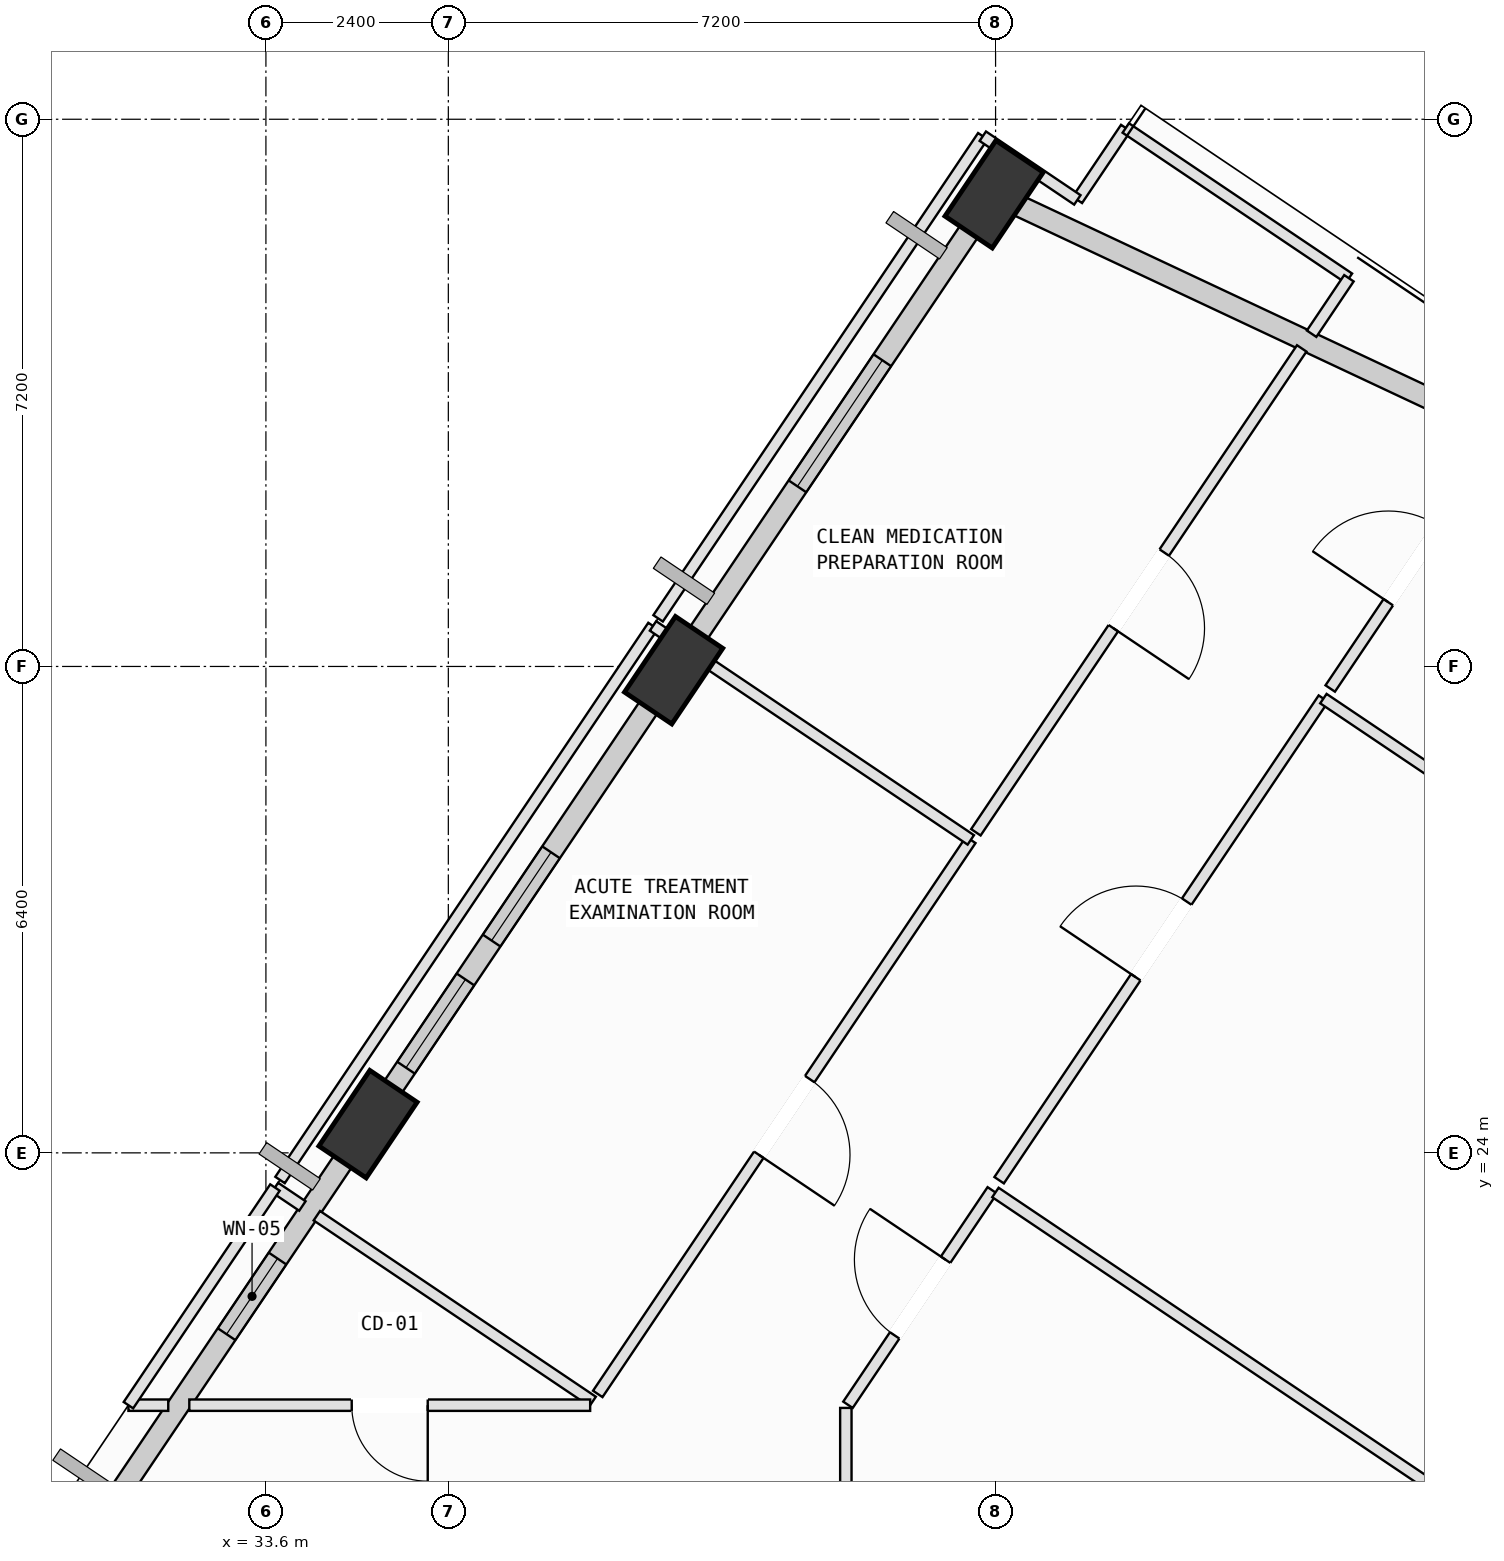
"""IFC4 building model, lengths in metres.
Left out: names, types, materials, properties, quantities, classifications, styles, units other than length and angle.
Written with IfcOpenShell. Run it as: python <this file> out.ifc"""

import sys

from ifc_helpers import new_model, si_unit, direction, frame, frame_2d, origin, origin_2d, place, context, subcontext, project, spatial, rectangle, extrude, element, fill, save


model = new_model("IFC4")
c1 = context("Model", 3, precision=1e-05, world=origin(), true_north=direction((0.0, 1.0)))
c2 = subcontext(c1, "Body", "Model", "MODEL_VIEW")
j1 = project(units=[si_unit("LENGTHUNIT", "METRE"), si_unit("PLANEANGLEUNIT", "RADIAN")], contexts=[c1])
p1 = place(None, origin())
s1 = spatial("IfcSite", under=j1, at=p1, CompositionType="ELEMENT")
p2 = place(p1, origin())
s2 = spatial("IfcBuilding", under=s1, at=p2, CompositionType="ELEMENT")
p3 = place(p2, frame((0.0, 0.0, 263.2)))
s3 = spatial("IfcBuildingStorey", under=s2, at=p3, CompositionType="ELEMENT", Elevation=263.2)
p4 = place(p3, frame((43.181, 36.614, 0.002), z_axis=(-0.049210235078, 0.039220187355, 0.998018100872), x_axis=(0.299343869523, -0.952716333944, 0.052199950338)))
e1 = element("IfcColumn", 1, at=p4, inside=s3, PredefinedType="COLUMN", context=c2, shape_type="SweptSolid", body=[
    extrude(rectangle(XDim=1.2, YDim=0.75, at=origin_2d()), origin(), (0.0, 0.0, 1.0), 3.959),
])
p5 = place(p3, frame((38.964, 30.351, 0.002), z_axis=(-0.023155395107, 0.02198841233, 0.99949003867), x_axis=(0.216657402082, -0.97588827635, 0.026488529682)))
e2 = element("IfcColumn", 2, at=p5, inside=s3, PredefinedType="COLUMN", context=c2, shape_type="SweptSolid", body=[
    extrude(rectangle(XDim=1.2, YDim=0.75, at=origin_2d()), origin(), (0.0, 0.0, 1.0), 3.975),
])
p6 = place(p3, frame((34.943, 24.378, 0.002), z_axis=(0.001651449321, 0.005565995859, 0.999983146061), x_axis=(-0.771351837529, -0.636390719713, 0.004816077748)))
e3 = element("IfcColumn", 3, at=p6, inside=s3, PredefinedType="COLUMN", context=c2, shape_type="SweptSolid", body=[
    extrude(rectangle(XDim=1.2, YDim=0.75, at=origin_2d()), origin(), (0.0, 0.0, 1.0), 3.991),
])
p7 = place(p3, frame((43.428, 36.497, 0.0), z_axis=(0.0, 0.0, 1.0), x_axis=(0.905122173165, -0.425151563145, 0.0)))
e4 = element("IfcWall", 4, at=p7, inside=s3, PredefinedType="SOLIDWALL", context=c2, shape_type="SweptSolid", body=[
    extrude(rectangle(XDim=9.036, YDim=0.28, at=frame_2d((4.518, 0.0))), origin(), (0.0, 0.0, 1.0), 3.185),
])
p8 = place(p3, frame((39.189, 30.685, 0.0), z_axis=(0.0, 0.0, 1.0), x_axis=(0.55845071532, 0.82953770171, 0.0)))
e5 = element("IfcWall", 5, at=p8, inside=s3, PredefinedType="SOLIDWALL", context=c2, shape_type="SweptSolid", body=[
    extrude(rectangle(XDim=6.78, YDim=0.28, at=frame_2d((3.39, 0.0))), origin(), (0.0, 0.0, 1.0), 3.185),
])
p9 = place(p8, frame((2.514, 0.0, 0.75)))
e6 = element("IfcOpeningElement", 6, at=p9, cuts=e5, PredefinedType="OPENING", context=c2, shape_type="SweptSolid", body=[
    extrude(rectangle(XDim=2.0, YDim=1.95, at=frame_2d((1.0, 0.975))), frame((0.0, 0.15, 0.0), z_axis=(0.0, -1.0, 0.0), x_axis=(1.0, 0.0, 0.0)), (0.0, 0.0, 1.0), 0.3),
])
p10 = place(p3, frame((35.171, 24.717, 0.0), z_axis=(0.0, 0.0, 1.0), x_axis=(0.558474163373, 0.829521915832, 0.0)))
e7 = element("IfcWall", 7, at=p10, inside=s3, PredefinedType="SOLIDWALL", context=c2, shape_type="SweptSolid", body=[
    extrude(rectangle(XDim=6.41, YDim=0.28, at=frame_2d((3.205, 0.0))), origin(), (0.0, 0.0, 1.0), 3.185),
])
p11 = place(p10, frame((2.503, 0.0, 0.75)))
e8 = element("IfcOpeningElement", 8, at=p11, cuts=e7, PredefinedType="OPENING", context=c2, shape_type="SweptSolid", body=[
    extrude(rectangle(XDim=1.4, YDim=1.85, at=frame_2d((0.7, 0.925))), frame((0.0, 0.15, 0.0), z_axis=(0.0, -1.0, 0.0), x_axis=(1.0, 0.0, 0.0)), (0.0, 0.0, 1.0), 0.3),
])
p12 = place(p10, frame((0.487, 0.0, 0.75)))
e9 = element("IfcOpeningElement", 9, at=p12, cuts=e7, PredefinedType="OPENING", context=c2, shape_type="SweptSolid", body=[
    extrude(rectangle(XDim=1.4, YDim=1.85, at=frame_2d((0.7, 0.925))), frame((0.0, 0.15, 0.0), z_axis=(0.0, -1.0, 0.0), x_axis=(1.0, 0.0, 0.0)), (0.0, 0.0, 1.0), 0.3),
])
p13 = place(p3, frame((31.288, 18.949, 0.0), z_axis=(0.0, 0.0, 1.0), x_axis=(0.558472908241, 0.829522760846, 0.0)))
e10 = element("IfcWall", 10, at=p13, inside=s3, PredefinedType="SOLIDWALL", context=c2, shape_type="SweptSolid", body=[
    extrude(rectangle(XDim=6.158, YDim=0.28, at=frame_2d((3.079, 0.0))), origin(), (0.0, 0.0, 1.0), 3.185),
])
p14 = place(p13, frame((3.213, 0.0, 0.75)))
e11 = element("IfcOpeningElement", 11, at=p14, cuts=e10, PredefinedType="OPENING", context=c2, shape_type="SweptSolid", body=[
    extrude(rectangle(XDim=1.2, YDim=1.75, at=frame_2d((0.6, 0.875))), frame((0.0, 0.15, 0.0), z_axis=(0.0, -1.0, 0.0), x_axis=(1.0, 0.0, 0.0)), (0.0, 0.0, 1.0), 0.3),
])
p15 = place(p3, frame((25.005, 22.69, 0.0), z_axis=(0.0, 0.0, 1.0), x_axis=(0.829509910624, -0.558491994729, 0.0)))
e12 = element("IfcWall", 12, at=p15, inside=s3, PredefinedType="SOLIDWALL", context=c2, shape_type="SweptSolid", body=[
    extrude(rectangle(XDim=6.958, YDim=0.28, at=frame_2d((3.479, 0.0))), origin(), (0.0, 0.0, 1.0), 3.085),
])
p16 = place(p3, frame((41.23, 17.95, 0.0), z_axis=(0.0, 0.0, 1.0), x_axis=(0.0, 1.0, 0.0)))
e13 = element("IfcWall", 13, at=p16, inside=s3, PredefinedType="PARTITIONING", context=c2, shape_type="SweptSolid", body=[
    extrude(rectangle(XDim=2.694, YDim=0.15, at=frame_2d((1.347, 0.0))), origin(), (0.0, 0.0, 1.0), 3.7),
])
p17 = place(p3, frame((41.258, 20.685, 0.0), z_axis=(0.0, 0.0, 1.0), x_axis=(0.558272819902, 0.829657434462, 0.0)))
e14 = element("IfcWall", 14, at=p17, inside=s3, PredefinedType="PARTITIONING", context=c2, shape_type="SweptSolid", body=[
    extrude(rectangle(XDim=3.401, YDim=0.15, at=frame_2d((1.701, 0.0))), origin(), (0.0, 0.0, 1.0), 3.7),
])
p18 = place(p17, frame((1.101, 0.0, 0.0)))
e15 = element("IfcOpeningElement", 15, at=p18, cuts=e14, PredefinedType="OPENING", context=c2, shape_type="SweptSolid", body=[
    extrude(rectangle(XDim=1.2, YDim=2.15, at=frame_2d((0.6, 1.075))), frame((0.0, 0.085, 0.0), z_axis=(0.0, -1.0, 0.0), x_axis=(1.0, 0.0, 0.0)), (0.0, 0.0, 1.0), 0.17),
])
p19 = place(p3, frame((43.198, 23.479, 0.0), z_axis=(0.0, 0.0, 1.0), x_axis=(0.829581933243, -0.558385006994, 0.0)))
e16 = element("IfcWall", 16, at=p19, inside=s3, PredefinedType="PARTITIONING", context=c2, shape_type="SweptSolid", body=[
    extrude(rectangle(XDim=13.466, YDim=0.15, at=frame_2d((6.733, 0.0))), origin(), (0.0, 0.0, 1.0), 3.7),
])
p20 = place(p3, frame((43.247, 23.64, 0.0), z_axis=(0.0, 0.0, 1.0), x_axis=(0.558419088265, 0.829558992394, 0.0)))
e17 = element("IfcWall", 17, at=p20, inside=s3, PredefinedType="PARTITIONING", context=c2, shape_type="SweptSolid", body=[
    extrude(rectangle(XDim=7.639, YDim=0.15, at=frame_2d((3.82, 0.0))), origin(), (0.0, 0.0, 1.0), 3.7),
])
p21 = place(p20, frame((3.219, 0.0, 0.0)))
e18 = element("IfcOpeningElement", 18, at=p21, cuts=e17, PredefinedType="OPENING", context=c2, shape_type="SweptSolid", body=[
    extrude(rectangle(XDim=1.2, YDim=2.15, at=frame_2d((0.6, 1.075))), frame((0.0, 0.085, 0.0), z_axis=(0.0, -1.0, 0.0), x_axis=(1.0, 0.0, 0.0)), (0.0, 0.0, 1.0), 0.17),
])
p22 = place(p3, frame((47.513, 29.977, 0.0), z_axis=(0.0, 0.0, 1.0), x_axis=(0.829559460975, -0.558418392164, 0.0)))
e19 = element("IfcWall", 19, at=p22, inside=s3, PredefinedType="PARTITIONING", context=c2, shape_type="SweptSolid", body=[
    extrude(rectangle(XDim=13.148, YDim=0.15, at=frame_2d((6.574, 0.0))), origin(), (0.0, 0.0, 1.0), 3.7),
])
p23 = place(p3, frame((47.603, 30.11, 0.0), z_axis=(0.0, 0.0, 1.0), x_axis=(0.558515056405, 0.829494383205, 0.0)))
e20 = element("IfcWall", 20, at=p23, inside=s3, PredefinedType="PARTITIONING", context=c2, shape_type="SweptSolid", body=[
    extrude(rectangle(XDim=3.937, YDim=0.15, at=frame_2d((1.969, 0.0))), origin(), (0.0, 0.0, 1.0), 3.7),
])
p24 = place(p23, frame((1.369, 0.0, 0.0)))
e21 = element("IfcOpeningElement", 21, at=p24, cuts=e20, PredefinedType="OPENING", context=c2, shape_type="SweptSolid", body=[
    extrude(rectangle(XDim=1.2, YDim=2.15, at=frame_2d((0.6, 1.075))), frame((0.0, 0.085, 0.0), z_axis=(0.0, -1.0, 0.0), x_axis=(1.0, 0.0, 0.0)), (0.0, 0.0, 1.0), 0.17),
])
p25 = place(p3, frame((33.719, 23.544, 0.0), z_axis=(0.0, 0.0, 1.0), x_axis=(0.82971266227, -0.55819073628, 0.0)))
e22 = element("IfcWall", 22, at=p25, inside=s3, PredefinedType="PARTITIONING", context=c2, shape_type="SweptSolid", body=[
    extrude(rectangle(XDim=0.435, YDim=0.15, at=frame_2d((0.218, 0.0))), origin(), (0.0, 0.0, 1.0), 3.7),
])
p26 = place(p3, frame((34.27, 23.173, 0.0), z_axis=(0.0, 0.0, 1.0), x_axis=(0.82942268085, -0.558621532427, 0.0)))
e23 = element("IfcWall", 23, at=p26, inside=s3, PredefinedType="PARTITIONING", context=c2, shape_type="SweptSolid", body=[
    extrude(rectangle(XDim=4.375, YDim=0.15, at=frame_2d((2.188, 0.0))), origin(), (0.0, 0.0, 1.0), 3.7),
])
p27 = place(p3, frame((37.866, 20.68, 0.0), z_axis=(0.0, 0.0, 1.0), x_axis=(-1.0, 0.0, 0.0)))
e24 = element("IfcWall", 24, at=p27, inside=s3, PredefinedType="PARTITIONING", context=c2, shape_type="SweptSolid", body=[
    extrude(rectangle(XDim=5.274, YDim=0.15, at=frame_2d((2.637, 0.0))), origin(), (0.0, 0.0, 1.0), 3.335),
])
p28 = place(p27, frame((2.137, 0.0, 0.0)))
e25 = element("IfcOpeningElement", 25, at=p28, cuts=e24, PredefinedType="OPENING", context=c2, shape_type="SweptSolid", body=[
    extrude(rectangle(XDim=1.0, YDim=2.12, at=frame_2d((0.5, 1.06))), frame((0.0, 0.085, 0.0), z_axis=(0.0, -1.0, 0.0), x_axis=(1.0, 0.0, 0.0)), (0.0, 0.0, 1.0), 0.17),
])
p29 = place(p3, frame((32.315, 20.68, 0.0), z_axis=(0.0, 0.0, 1.0), x_axis=(-1.0, 0.0, 0.0)))
e26 = element("IfcWall", 26, at=p29, inside=s3, PredefinedType="PARTITIONING", context=c2, shape_type="SweptSolid", body=[
    extrude(rectangle(XDim=0.524, YDim=0.15, at=frame_2d((0.262, 0.0))), origin(), (0.0, 0.0, 1.0), 3.7),
])
p30 = place(p3, frame((31.791, 20.68, 0.0), z_axis=(0.0, 0.0, 1.0), x_axis=(0.558431585415, 0.829550579778, 0.0)))
e27 = element("IfcWall", 27, at=p30, inside=s3, PredefinedType="PARTITIONING", context=c2, shape_type="SweptSolid", body=[
    extrude(rectangle(XDim=3.452, YDim=0.15, at=frame_2d((1.726, 0.0))), origin(), (0.0, 0.0, 1.0), 3.7),
])
p31 = place(p3, frame((42.874, 28.118, 0.0), z_axis=(0.0, 0.0, 1.0), x_axis=(-0.558470489053, -0.829524389549, 0.0)))
e28 = element("IfcWall", 28, at=p31, inside=s3, PredefinedType="PARTITIONING", context=c2, shape_type="SweptSolid", body=[
    extrude(rectangle(XDim=8.788, YDim=0.15, at=frame_2d((4.394, 0.0))), origin(), (0.0, 0.0, 1.0), 3.7),
])
p32 = place(p31, frame((3.794, 0.0, 0.0)))
e29 = element("IfcOpeningElement", 29, at=p32, cuts=e28, PredefinedType="OPENING", context=c2, shape_type="SweptSolid", body=[
    extrude(rectangle(XDim=1.2, YDim=2.15, at=frame_2d((0.6, 1.075))), frame((0.0, 0.085, 0.0), z_axis=(0.0, -1.0, 0.0), x_axis=(1.0, 0.0, 0.0)), (0.0, 0.0, 1.0), 0.17),
])
p33 = place(p3, frame((33.786, 23.643, 0.0), z_axis=(0.0, 0.0, 1.0), x_axis=(0.558413136962, 0.829562998492, 0.0)))
e30 = element("IfcWall", 30, at=p33, inside=s3, PredefinedType="PARTITIONING", context=c2, shape_type="SweptSolid", body=[
    extrude(rectangle(XDim=8.788, YDim=0.15, at=frame_2d((4.394, 0.0))), origin(), (0.0, 0.0, 1.0), 3.185),
])
p34 = place(p3, frame((38.693, 30.933, 0.0), z_axis=(0.0, 0.0, 1.0), x_axis=(0.829512145204, -0.558488675767, 0.0)))
e31 = element("IfcWall", 31, at=p34, inside=s3, PredefinedType="PARTITIONING", context=c2, shape_type="SweptSolid", body=[
    extrude(rectangle(XDim=0.46, YDim=0.15, at=frame_2d((0.23, 0.0))), origin(), (0.0, 0.0, 1.0), 3.7),
])
p35 = place(p3, frame((39.224, 30.575, 0.0), z_axis=(0.0, 0.0, 1.0), x_axis=(0.829549190565, -0.558433649087, 0.0)))
e32 = element("IfcWall", 32, at=p35, inside=s3, PredefinedType="PARTITIONING", context=c2, shape_type="SweptSolid", body=[
    extrude(rectangle(XDim=4.4, YDim=0.15, at=frame_2d((2.2, 0.0))), origin(), (0.0, 0.0, 1.0), 3.7),
])
p36 = place(p3, frame((44.276, 36.539, 0.0), z_axis=(0.0, 0.0, 1.0), x_axis=(0.558645455931, 0.829406567714, 0.0)))
e33 = element("IfcWall", 33, at=p36, inside=s3, PredefinedType="PARTITIONING", context=c2, shape_type="SweptSolid", body=[
    extrude(rectangle(XDim=1.141, YDim=0.15, at=frame_2d((0.57, 0.0))), origin(), (0.0, 0.0, 1.0), 3.7),
])
p37 = place(p3, frame((44.913, 37.485, 0.0), z_axis=(0.0, 0.0, 1.0), x_axis=(0.829473447608, -0.55854614824, 0.0)))
e34 = element("IfcWall", 34, at=p37, inside=s3, PredefinedType="PARTITIONING", context=c2, shape_type="SweptSolid", body=[
    extrude(rectangle(XDim=3.54, YDim=0.15, at=frame_2d((1.77, 0.0))), origin(), (0.0, 0.0, 1.0), 3.7),
])
p38 = place(p3, frame((47.849, 35.508, 0.0), z_axis=(0.0, 0.0, 1.0), x_axis=(-0.558280883345, -0.82965200855, 0.0)))
e35 = element("IfcWall", 35, at=p38, inside=s3, PredefinedType="PARTITIONING", context=c2, shape_type="SweptSolid", body=[
    extrude(rectangle(XDim=0.88, YDim=0.15, at=frame_2d((0.44, 0.0))), origin(), (0.0, 0.0, 1.0), 3.7),
])
p39 = place(p3, frame((47.228, 34.585, 0.0), z_axis=(0.0, 0.0, 1.0), x_axis=(-0.558525800059, -0.829487149188, 0.0)))
e36 = element("IfcWall", 36, at=p39, inside=s3, PredefinedType="PARTITIONING", context=c2, shape_type="SweptSolid", body=[
    extrude(rectangle(XDim=7.676, YDim=0.15, at=frame_2d((3.838, 0.0))), origin(), (0.0, 0.0, 1.0), 3.7),
])
p40 = place(p39, frame((3.238, 0.0, 0.0)))
e37 = element("IfcOpeningElement", 37, at=p40, cuts=e36, PredefinedType="OPENING", context=c2, shape_type="SweptSolid", body=[
    extrude(rectangle(XDim=1.2, YDim=2.15, at=frame_2d((0.6, 1.075))), frame((0.0, 0.085, 0.0), z_axis=(0.0, -1.0, 0.0), x_axis=(1.0, 0.0, 0.0)), (0.0, 0.0, 1.0), 0.17),
])
p41 = place(p3, frame((38.76, 31.033, 0.0), z_axis=(0.0, 0.0, 1.0), x_axis=(0.558554216594, 0.829468014528, 0.0)))
e38 = element("IfcWall", 38, at=p41, inside=s3, PredefinedType="PARTITIONING", context=c2, shape_type="SweptSolid", body=[
    extrude(rectangle(XDim=7.648, YDim=0.15, at=frame_2d((3.824, 0.0))), origin(), (0.0, 0.0, 1.0), 3.185),
])
p42 = place(p3, frame((43.032, 37.377, 0.0), z_axis=(0.0, 0.0, 1.0), x_axis=(0.82938612937, -0.558675799018, 0.0)))
e39 = element("IfcWall", 39, at=p42, inside=s3, PredefinedType="PARTITIONING", context=c2, shape_type="SweptSolid", body=[
    extrude(rectangle(XDim=1.5, YDim=0.15, at=frame_2d((0.75, 0.0))), origin(), (0.0, 0.0, 1.0), 3.185),
])
p43 = place(p9, origin())
e40 = element("IfcWindow", 40, at=p43, inside=s3, PartitioningType="SINGLE_PANEL", PredefinedType="WINDOW", context=c2, shape_type="SweptSolid", body=[
    extrude(rectangle(XDim=2.0, YDim=1.95, at=frame_2d((1.0, 0.975))), frame((0.0, 0.03, 0.0), z_axis=(0.0, -1.0, 0.0), x_axis=(1.0, 0.0, 0.0)), (0.0, 0.0, 1.0), 0.06),
])
fill(e6, e40)
p44 = place(p11, origin())
e41 = element("IfcWindow", 41, at=p44, inside=s3, PartitioningType="SINGLE_PANEL", PredefinedType="WINDOW", context=c2, shape_type="SweptSolid", body=[
    extrude(rectangle(XDim=1.4, YDim=1.85, at=frame_2d((0.7, 0.925))), frame((0.0, 0.03, 0.0), z_axis=(0.0, -1.0, 0.0), x_axis=(1.0, 0.0, 0.0)), (0.0, 0.0, 1.0), 0.06),
])
fill(e8, e41)
p45 = place(p12, origin())
e42 = element("IfcWindow", 42, at=p45, inside=s3, PartitioningType="SINGLE_PANEL", PredefinedType="WINDOW", context=c2, shape_type="SweptSolid", body=[
    extrude(rectangle(XDim=1.4, YDim=1.85, at=frame_2d((0.7, 0.925))), frame((0.0, 0.03, 0.0), z_axis=(0.0, -1.0, 0.0), x_axis=(1.0, 0.0, 0.0)), (0.0, 0.0, 1.0), 0.06),
])
fill(e9, e42)
p46 = place(p14, origin())
e43 = element("IfcWindow", 43, at=p46, inside=s3, PartitioningType="SINGLE_PANEL", PredefinedType="WINDOW", context=c2, shape_type="SweptSolid", body=[
    extrude(rectangle(XDim=1.2, YDim=1.75, at=frame_2d((0.6, 0.875))), frame((0.0, 0.03, 0.0), z_axis=(0.0, -1.0, 0.0), x_axis=(1.0, 0.0, 0.0)), (0.0, 0.0, 1.0), 0.06),
])
fill(e11, e43)
p47 = place(p18, origin())
e44 = element("IfcDoor", 44, at=p47, inside=s3, OperationType="SINGLE_SWING_RIGHT", PredefinedType="DOOR", context=c2, shape_type="SweptSolid", body=[
    extrude(rectangle(XDim=1.2, YDim=2.15, at=frame_2d((0.6, 1.075))), frame((0.0, 0.025, 0.0), z_axis=(0.0, -1.0, 0.0), x_axis=(1.0, 0.0, 0.0)), (0.0, 0.0, 1.0), 0.05),
])
fill(e15, e44)
p48 = place(p21, origin())
e45 = element("IfcDoor", 45, at=p48, inside=s3, OperationType="SINGLE_SWING_LEFT", PredefinedType="DOOR", context=c2, shape_type="SweptSolid", body=[
    extrude(rectangle(XDim=1.2, YDim=2.15, at=frame_2d((0.6, 1.075))), frame((0.0, 0.025, 0.0), z_axis=(0.0, -1.0, 0.0), x_axis=(1.0, 0.0, 0.0)), (0.0, 0.0, 1.0), 0.05),
])
fill(e18, e45)
p49 = place(p24, origin())
e46 = element("IfcDoor", 46, at=p49, inside=s3, OperationType="SINGLE_SWING_LEFT", PredefinedType="DOOR", context=c2, shape_type="SweptSolid", body=[
    extrude(rectangle(XDim=1.2, YDim=2.15, at=frame_2d((0.6, 1.075))), frame((0.0, 0.025, 0.0), z_axis=(0.0, -1.0, 0.0), x_axis=(1.0, 0.0, 0.0)), (0.0, 0.0, 1.0), 0.05),
])
fill(e21, e46)
p50 = place(p28, origin())
e47 = element("IfcDoor", 47, at=p50, inside=s3, OperationType="SINGLE_SWING_LEFT", PredefinedType="DOOR", context=c2, shape_type="SweptSolid", body=[
    extrude(rectangle(XDim=1.0, YDim=2.12, at=frame_2d((0.5, 1.06))), frame((0.0, 0.025, 0.0), z_axis=(0.0, -1.0, 0.0), x_axis=(1.0, 0.0, 0.0)), (0.0, 0.0, 1.0), 0.05),
])
fill(e25, e47)
p51 = place(p32, origin())
e48 = element("IfcDoor", 48, at=p51, inside=s3, OperationType="SINGLE_SWING_RIGHT", PredefinedType="DOOR", context=c2, shape_type="SweptSolid", body=[
    extrude(rectangle(XDim=1.2, YDim=2.15, at=frame_2d((0.6, 1.075))), frame((0.0, 0.025, 0.0), z_axis=(0.0, -1.0, 0.0), x_axis=(1.0, 0.0, 0.0)), (0.0, 0.0, 1.0), 0.05),
])
fill(e29, e48)
p52 = place(p40, origin())
e49 = element("IfcDoor", 49, at=p52, inside=s3, OperationType="SINGLE_SWING_RIGHT", PredefinedType="DOOR", context=c2, shape_type="SweptSolid", body=[
    extrude(rectangle(XDim=1.2, YDim=2.15, at=frame_2d((0.6, 1.075))), frame((0.0, 0.025, 0.0), z_axis=(0.0, -1.0, 0.0), x_axis=(1.0, 0.0, 0.0)), (0.0, 0.0, 1.0), 0.05),
])
fill(e37, e49)
save(model, sys.argv[1])
